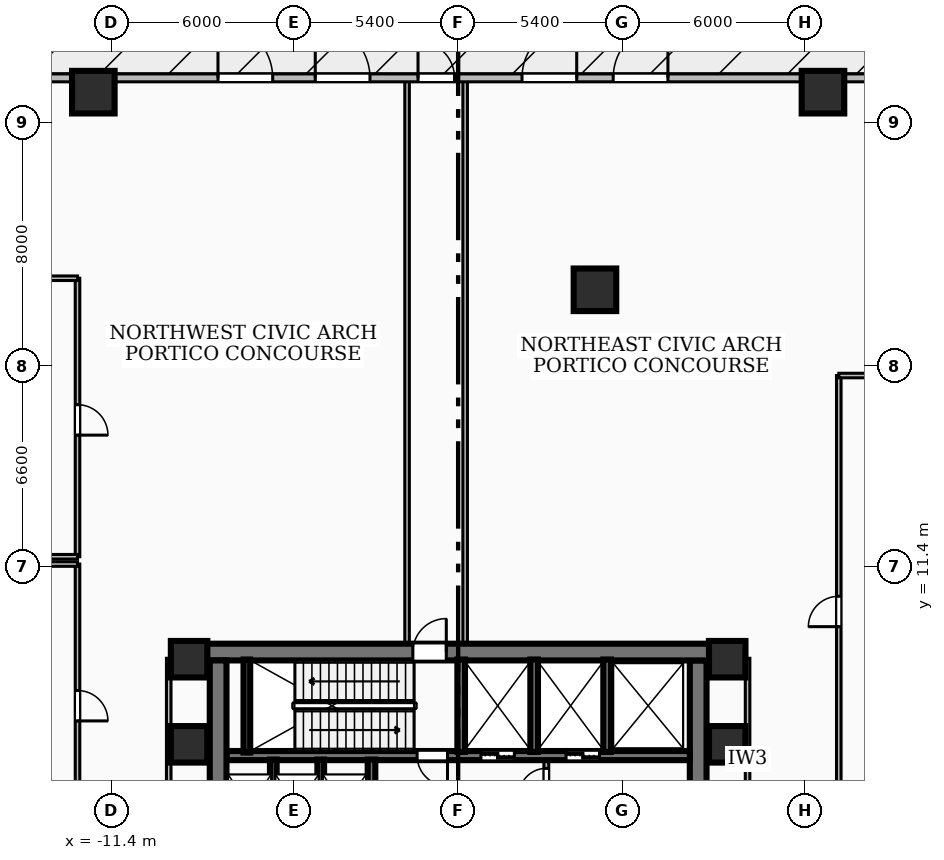
"""IFC4 building model, lengths in metres.
Left out: names, types, materials, properties, quantities, classifications, styles, units other than length and angle.
Written with IfcOpenShell. Run it as: python <this file> out.ifc"""

import sys

from ifc_helpers import new_model, si_unit, direction, frame, frame_2d, origin, origin_2d, place, context, subcontext, project, spatial, rectangle, extrude, element, fill, save


model = new_model("IFC4")
c1 = context("Model", 3, precision=1e-05, world=origin(), true_north=direction((0.0, 1.0)))
c2 = subcontext(c1, "Body", "Model", "MODEL_VIEW")
j1 = project(units=[si_unit("LENGTHUNIT", "METRE"), si_unit("PLANEANGLEUNIT", "RADIAN")], contexts=[c1])
p1 = place(None, origin())
s1 = spatial("IfcSite", under=j1, at=p1, CompositionType="ELEMENT")
p2 = place(p1, origin())
s2 = spatial("IfcBuilding", under=s1, at=p2, CompositionType="ELEMENT")
p3 = place(p2, origin())
s3 = spatial("IfcBuildingStorey", under=s2, at=p3, CompositionType="ELEMENT", Elevation=0.0)
p4 = place(p3, frame((-8.78, 8.585, 0.0), z_axis=(0.0, 0.0, 1.0), x_axis=(1.0, 0.0, 0.0)))
e1 = element("IfcWall", 1, at=p4, inside=s3, PredefinedType="SHEAR", context=c2, shape_type="SweptSolid", body=[
    extrude(rectangle(XDim=17.56, YDim=0.55, at=frame_2d((8.78, 0.0))), origin(), (0.0, 0.0, 1.0), 5.08),
])
p5 = place(p4, frame((7.29, 0.0, 0.0)))
e2 = element("IfcOpeningElement", 2, at=p5, cuts=e1, PredefinedType="OPENING", context=c2, shape_type="SweptSolid", body=[
    extrude(rectangle(XDim=1.1, YDim=2.15, at=frame_2d((0.55, 1.075))), frame((0.0, 0.285, 0.0), z_axis=(0.0, -1.0, 0.0), x_axis=(1.0, 0.0, 0.0)), (0.0, 0.0, 1.0), 0.57),
])
for number, where, z_axis, x_axis in (
    (3, (-7.895, 2.025, 0.0), (0.0, 0.0, 1.0), (0.0, 1.0, 0.0)),
    (4, (7.895, 8.31, 0.0), (0.0, 0.0, 1.0), (0.0, -1.0, 0.0)),
):
    element("IfcWall", number, at=place(p3, frame(where, z_axis=z_axis, x_axis=x_axis)), inside=s3, PredefinedType="SHEAR", context=c2, shape_type="SweptSolid", body=[
        extrude(rectangle(XDim=6.285, YDim=0.55, at=frame_2d((3.143, 0.0))), origin(), (0.0, 0.0, 1.0), 5.08),
    ])
p6 = place(p3, frame((7.62, 5.18, 0.0), z_axis=(0.0, 0.0, 1.0), x_axis=(-1.0, 0.0, 0.0)))
e5 = element("IfcWall", 5, at=p6, inside=s3, PredefinedType="SOLIDWALL", context=c2, shape_type="SweptSolid", body=[
    extrude(rectangle(XDim=15.24, YDim=0.3, at=frame_2d((7.62, 0.0))), origin(), (0.0, 0.0, 1.0), 5.08),
])
p7 = place(p6, frame((5.77, 0.0, 0.0)))
e6 = element("IfcOpeningElement", 6, at=p7, cuts=e5, PredefinedType="OPENING", context=c2, shape_type="SweptSolid", body=[
    extrude(rectangle(XDim=1.1, YDim=2.15, at=frame_2d((0.55, 1.075))), frame((0.0, 0.16, 0.0), z_axis=(0.0, -1.0, 0.0), x_axis=(1.0, 0.0, 0.0)), (0.0, 0.0, 1.0), 0.32),
])
p8 = place(p6, frame((2.97, 0.0, 0.0)))
e7 = element("IfcOpeningElement", 7, at=p8, cuts=e5, PredefinedType="OPENING", context=c2, shape_type="SweptSolid", body=[
    extrude(rectangle(XDim=1.1, YDim=2.15, at=frame_2d((0.55, 1.075))), frame((0.0, 0.16, 0.0), z_axis=(0.0, -1.0, 0.0), x_axis=(1.0, 0.0, 0.0)), (0.0, 0.0, 1.0), 0.32),
])
p9 = place(p6, frame((7.97, 0.0, 0.0)))
e8 = element("IfcOpeningElement", 8, at=p9, cuts=e5, PredefinedType="OPENING", context=c2, shape_type="SweptSolid", body=[
    extrude(rectangle(XDim=1.0, YDim=2.1, at=frame_2d((0.5, 1.05))), frame((0.0, 0.16, 0.0), z_axis=(0.0, -1.0, 0.0), x_axis=(1.0, 0.0, 0.0)), (0.0, 0.0, 1.0), 0.32),
])
p10 = place(p3, frame((-6.95, 5.28, 0.0), z_axis=(0.0, 0.0, 1.0), x_axis=(0.0, 1.0, 0.0)))
e9 = element("IfcWall", 9, at=p10, inside=s3, PredefinedType="SOLIDWALL", context=c2, shape_type="SweptSolid", body=[
    extrude(rectangle(XDim=3.06, YDim=0.22, at=frame_2d((1.53, 0.0))), origin(), (0.0, 0.0, 1.0), 5.08),
])
for number, where, z_axis, x_axis in (
    (10, (0.1, 5.3, 0.0), (0.0, 0.0, 1.0), (0.0, 1.0, 0.0)),
    (11, (2.5, 5.3, 0.0), (0.0, 0.0, 1.0), (0.0, 1.0, 0.0)),
    (12, (4.9, 5.3, 0.0), (0.0, 0.0, 1.0), (0.0, 1.0, 0.0)),
):
    element("IfcWall", number, at=place(p3, frame(where, z_axis=z_axis, x_axis=x_axis)), inside=s3, PredefinedType="SOLIDWALL", context=c2, shape_type="SweptSolid", body=[
        extrude(rectangle(XDim=3.04, YDim=0.25, at=frame_2d((1.52, 0.0))), origin(), (0.0, 0.0, 1.0), 5.08),
    ])
p11 = place(p3, frame((-2.85, 1.98, 0.0), z_axis=(0.0, 0.0, 1.0), x_axis=(0.0, 1.0, 0.0)))
e13 = element("IfcWall", 13, at=p11, inside=s3, PredefinedType="SOLIDWALL", context=c2, shape_type="SweptSolid", body=[
    extrude(rectangle(XDim=3.07, YDim=0.25, at=frame_2d((1.535, 0.0))), origin(), (0.0, 0.0, 1.0), 5.08),
])
for number, where, z_axis, x_axis in (
    (14, (-6.08, 1.98, 0.0), (0.0, 0.0, 1.0), (0.0, 1.0, 0.0)),
    (15, (-4.52, 1.98, 0.0), (0.0, 0.0, 1.0), (0.0, 1.0, 0.0)),
):
    element("IfcWall", number, at=place(p3, frame(where, z_axis=z_axis, x_axis=x_axis)), inside=s3, PredefinedType="SOLIDWALL", context=c2, shape_type="SweptSolid", body=[
        extrude(rectangle(XDim=3.07, YDim=0.22, at=frame_2d((1.535, 0.0))), origin(), (0.0, 0.0, 1.0), 5.08),
    ])
for number, where, z_axis, x_axis in (
    (16, (-8.85, 5.55, 0.0), (0.0, 0.0, 1.0), (1.0, 0.0, 0.0)),
    (17, (8.85, 5.55, 0.0), (0.0, 0.0, 1.0), (1.0, 0.0, 0.0)),
    (18, (-8.85, 8.35, 0.0), (0.0, 0.0, 1.0), (1.0, 0.0, 0.0)),
    (19, (8.85, 8.35, 0.0), (0.0, 0.0, 1.0), (1.0, 0.0, 0.0)),
):
    element("IfcColumn", number, at=place(p3, frame(where, z_axis=z_axis, x_axis=x_axis)), inside=s3, PredefinedType="COLUMN", context=c2, shape_type="SweptSolid", body=[
        extrude(rectangle(XDim=1.2, YDim=1.2, at=origin_2d()), origin(), (0.0, 0.0, 1.0), 5.4),
    ])
for number, where, z_axis, x_axis in (
    (20, (-12.0, 27.0, 0.0), (0.0, 0.0, 1.0), (1.0, 0.0, 0.0)),
    (21, (12.0, 27.0, 0.0), (0.0, 0.0, 1.0), (1.0, 0.0, 0.0)),
    (22, (4.5, 20.5, 0.0), (0.0, 0.0, 1.0), (1.0, 0.0, 0.0)),
):
    element("IfcColumn", number, at=place(p3, frame(where, z_axis=z_axis, x_axis=x_axis)), inside=s3, PredefinedType="COLUMN", context=c2, shape_type="SweptSolid", body=[
        extrude(rectangle(XDim=1.4, YDim=1.4, at=origin_2d()), origin(), (0.0, 0.0, 1.0), 5.4),
    ])
p12 = place(p3, frame((-36.0, 27.47, 0.0), z_axis=(0.0, 0.0, 1.0), x_axis=(1.0, 0.0, 0.0)))
e23 = element("IfcWall", 23, at=p12, inside=s3, PredefinedType="SOLIDWALL", context=c2, shape_type="SweptSolid", body=[
    extrude(rectangle(XDim=72.0, YDim=0.26, at=frame_2d((36.0, 0.0))), origin(), (0.0, 0.0, 1.0), 5.08),
])
p13 = place(p12, frame((34.68, 0.0, 0.0)))
e24 = element("IfcOpeningElement", 24, at=p13, cuts=e23, PredefinedType="OPENING", context=c2, shape_type="SweptSolid", body=[
    extrude(rectangle(XDim=1.2, YDim=2.15, at=frame_2d((0.6, 1.075))), frame((0.0, 0.14, 0.0), z_axis=(0.0, -1.0, 0.0), x_axis=(1.0, 0.0, 0.0)), (0.0, 0.0, 1.0), 0.28),
])
p14 = place(p12, frame((28.1, 0.0, 0.0)))
e25 = element("IfcOpeningElement", 25, at=p14, cuts=e23, PredefinedType="OPENING", context=c2, shape_type="SweptSolid", body=[
    extrude(rectangle(XDim=1.8, YDim=2.3, at=frame_2d((0.9, 1.15))), frame((0.0, 0.14, 0.0), z_axis=(0.0, -1.0, 0.0), x_axis=(1.0, 0.0, 0.0)), (0.0, 0.0, 1.0), 0.28),
])
p15 = place(p12, frame((31.3, 0.0, 0.0)))
e26 = element("IfcOpeningElement", 26, at=p15, cuts=e23, PredefinedType="OPENING", context=c2, shape_type="SweptSolid", body=[
    extrude(rectangle(XDim=1.8, YDim=2.3, at=frame_2d((0.9, 1.15))), frame((0.0, 0.14, 0.0), z_axis=(0.0, -1.0, 0.0), x_axis=(1.0, 0.0, 0.0)), (0.0, 0.0, 1.0), 0.28),
])
p16 = place(p12, frame((38.1, 0.0, 0.0)))
e27 = element("IfcOpeningElement", 27, at=p16, cuts=e23, PredefinedType="OPENING", context=c2, shape_type="SweptSolid", body=[
    extrude(rectangle(XDim=1.8, YDim=2.3, at=frame_2d((0.9, 1.15))), frame((0.0, 0.14, 0.0), z_axis=(0.0, -1.0, 0.0), x_axis=(1.0, 0.0, 0.0)), (0.0, 0.0, 1.0), 0.28),
])
p17 = place(p12, frame((41.1, 0.0, 0.0)))
e28 = element("IfcOpeningElement", 28, at=p17, cuts=e23, PredefinedType="OPENING", context=c2, shape_type="SweptSolid", body=[
    extrude(rectangle(XDim=1.8, YDim=2.3, at=frame_2d((0.9, 1.15))), frame((0.0, 0.14, 0.0), z_axis=(0.0, -1.0, 0.0), x_axis=(1.0, 0.0, 0.0)), (0.0, 0.0, 1.0), 0.28),
])
p18 = place(p12, frame((60.8, 0.0, 0.0)))
e29 = element("IfcOpeningElement", 29, at=p18, cuts=e23, PredefinedType="OPENING", context=c2, shape_type="SweptSolid", body=[
    extrude(rectangle(XDim=6.0, YDim=3.1, at=frame_2d((3.0, 1.55))), frame((0.0, 0.14, 0.0), z_axis=(0.0, -1.0, 0.0), x_axis=(1.0, 0.0, 0.0)), (0.0, 0.0, 1.0), 0.28),
])
p19 = place(p3, frame((2.9, 2.04, 0.0), z_axis=(0.0, 0.0, 1.0), x_axis=(0.0, 1.0, 0.0)))
e30 = element("IfcWall", 30, at=p19, inside=s3, PredefinedType="PARTITIONING", context=c2, shape_type="SweptSolid", body=[
    extrude(rectangle(XDim=2.94, YDim=0.16, at=frame_2d((1.47, 0.0))), origin(), (0.0, 0.0, 1.0), 4.145),
])
p20 = place(p19, frame((1.82, 0.0, 0.0)))
e31 = element("IfcOpeningElement", 31, at=p20, cuts=e30, PredefinedType="OPENING", context=c2, shape_type="SweptSolid", body=[
    extrude(rectangle(XDim=0.9, YDim=2.06, at=frame_2d((0.45, 1.03))), frame((0.0, 0.09, 0.0), z_axis=(0.0, -1.0, 0.0), x_axis=(1.0, 0.0, 0.0)), (0.0, 0.0, 1.0), 0.18),
])
for number, where, z_axis, x_axis in (
    (32, (-9.52, 1.75, 0.0), (0.0, 0.0, 1.0), (0.0, 1.0, 0.0)),
    (33, (9.52, 1.75, 0.0), (0.0, 0.0, 1.0), (0.0, 1.0, 0.0)),
):
    element("IfcWall", number, at=place(p3, frame(where, z_axis=z_axis, x_axis=x_axis)), inside=s3, PredefinedType="PARTITIONING", context=c2, shape_type="SweptSolid", body=[
        extrude(rectangle(XDim=6.63, YDim=0.15, at=frame_2d((3.315, 0.0))), origin(), (0.0, 0.0, 1.0), 4.09),
    ])
for number, where, z_axis, x_axis in (
    (34, (-1.68, 8.7, 0.0), (0.0, 0.0, 1.0), (0.0, 1.0, 0.0)),
    (35, (0.23, 8.7, 0.0), (0.0, 0.0, 1.0), (0.0, 1.0, 0.0)),
):
    element("IfcWall", number, at=place(p3, frame(where, z_axis=z_axis, x_axis=x_axis)), inside=s3, PredefinedType="PARTITIONING", context=c2, shape_type="SweptSolid", body=[
        extrude(rectangle(XDim=18.7, YDim=0.15, at=frame_2d((9.35, 0.0))), origin(), (0.0, 0.0, 1.0), 4.09),
    ])
p21 = place(p3, frame((-12.52, 11.48, 0.0), z_axis=(0.0, 0.0, 1.0), x_axis=(0.0, -1.0, 0.0)))
e36 = element("IfcWall", 36, at=p21, inside=s3, PredefinedType="PARTITIONING", context=c2, shape_type="SweptSolid", body=[
    extrude(rectangle(XDim=9.16, YDim=0.15, at=frame_2d((4.58, 0.0))), origin(), (0.0, 0.0, 1.0), 4.09),
])
p22 = place(p21, frame((4.16, 0.0, 0.0)))
e37 = element("IfcOpeningElement", 37, at=p22, cuts=e36, PredefinedType="OPENING", context=c2, shape_type="SweptSolid", body=[
    extrude(rectangle(XDim=1.0, YDim=2.1, at=frame_2d((0.5, 1.05))), frame((0.0, 0.085, 0.0), z_axis=(0.0, -1.0, 0.0), x_axis=(1.0, 0.0, 0.0)), (0.0, 0.0, 1.0), 0.17),
])
p23 = place(p3, frame((-22.8, 11.48, 0.0), z_axis=(0.0, 0.0, 1.0), x_axis=(1.0, 0.0, 0.0)))
e38 = element("IfcWall", 38, at=p23, inside=s3, PredefinedType="PARTITIONING", context=c2, shape_type="SweptSolid", body=[
    extrude(rectangle(XDim=10.28, YDim=0.15, at=frame_2d((5.14, 0.0))), origin(), (0.0, 0.0, 1.0), 5.08),
])
p24 = place(p3, frame((-12.52, 20.88, 0.0), z_axis=(0.0, 0.0, 1.0), x_axis=(0.0, -1.0, 0.0)))
e39 = element("IfcWall", 39, at=p24, inside=s3, PredefinedType="PARTITIONING", context=c2, shape_type="SweptSolid", body=[
    extrude(rectangle(XDim=9.16, YDim=0.15, at=frame_2d((4.58, 0.0))), origin(), (0.0, 0.0, 1.0), 4.09),
])
p25 = place(p24, frame((4.16, 0.0, 0.0)))
e40 = element("IfcOpeningElement", 40, at=p25, cuts=e39, PredefinedType="OPENING", context=c2, shape_type="SweptSolid", body=[
    extrude(rectangle(XDim=1.0, YDim=2.1, at=frame_2d((0.5, 1.05))), frame((0.0, 0.085, 0.0), z_axis=(0.0, -1.0, 0.0), x_axis=(1.0, 0.0, 0.0)), (0.0, 0.0, 1.0), 0.17),
])
for number, where, z_axis, x_axis in (
    (41, (-22.8, 11.72, 0.0), (0.0, 0.0, 1.0), (1.0, 0.0, 0.0)),
    (42, (-22.8, 20.88, 0.0), (0.0, 0.0, 1.0), (1.0, 0.0, 0.0)),
):
    element("IfcWall", number, at=place(p3, frame(where, z_axis=z_axis, x_axis=x_axis)), inside=s3, PredefinedType="PARTITIONING", context=c2, shape_type="SweptSolid", body=[
        extrude(rectangle(XDim=10.28, YDim=0.15, at=frame_2d((5.14, 0.0))), origin(), (0.0, 0.0, 1.0), 5.08),
    ])
p26 = place(p3, frame((12.52, 2.32, 0.0), z_axis=(0.0, 0.0, 1.0), x_axis=(0.0, 1.0, 0.0)))
e43 = element("IfcWall", 43, at=p26, inside=s3, PredefinedType="PARTITIONING", context=c2, shape_type="SweptSolid", body=[
    extrude(rectangle(XDim=15.36, YDim=0.15, at=frame_2d((7.68, 0.0))), origin(), (0.0, 0.0, 1.0), 4.09),
])
p27 = place(p26, frame((7.1, 0.0, 0.0)))
e44 = element("IfcOpeningElement", 44, at=p27, cuts=e43, PredefinedType="OPENING", context=c2, shape_type="SweptSolid", body=[
    extrude(rectangle(XDim=1.0, YDim=2.1, at=frame_2d((0.5, 1.05))), frame((0.0, 0.085, 0.0), z_axis=(0.0, -1.0, 0.0), x_axis=(1.0, 0.0, 0.0)), (0.0, 0.0, 1.0), 0.17),
])
p28 = place(p3, frame((12.52, 17.68, 0.0), z_axis=(0.0, 0.0, 1.0), x_axis=(1.0, 0.0, 0.0)))
e45 = element("IfcWall", 45, at=p28, inside=s3, PredefinedType="PARTITIONING", context=c2, shape_type="SweptSolid", body=[
    extrude(rectangle(XDim=10.08, YDim=0.15, at=frame_2d((5.04, 0.0))), origin(), (0.0, 0.0, 1.0), 5.08),
])
p29 = place(p13, origin())
e46 = element("IfcDoor", 46, at=p29, inside=s3, OperationType="SINGLE_SWING_LEFT", PredefinedType="DOOR", context=c2, shape_type="SweptSolid", body=[
    extrude(rectangle(XDim=1.2, YDim=2.15, at=frame_2d((0.6, 1.075))), frame((0.0, 0.025, 0.0), z_axis=(0.0, -1.0, 0.0), x_axis=(1.0, 0.0, 0.0)), (0.0, 0.0, 1.0), 0.05),
])
fill(e24, e46)
p30 = place(p14, origin())
e47 = element("IfcDoor", 47, at=p30, inside=s3, OperationType="SINGLE_SWING_LEFT", PredefinedType="DOOR", context=c2, shape_type="SweptSolid", body=[
    extrude(rectangle(XDim=1.8, YDim=2.3, at=frame_2d((0.9, 1.15))), frame((0.0, 0.025, 0.0), z_axis=(0.0, -1.0, 0.0), x_axis=(1.0, 0.0, 0.0)), (0.0, 0.0, 1.0), 0.05),
])
fill(e25, e47)
p31 = place(p15, origin())
e48 = element("IfcDoor", 48, at=p31, inside=s3, OperationType="SINGLE_SWING_LEFT", PredefinedType="DOOR", context=c2, shape_type="SweptSolid", body=[
    extrude(rectangle(XDim=1.8, YDim=2.3, at=frame_2d((0.9, 1.15))), frame((0.0, 0.025, 0.0), z_axis=(0.0, -1.0, 0.0), x_axis=(1.0, 0.0, 0.0)), (0.0, 0.0, 1.0), 0.05),
])
fill(e26, e48)
p32 = place(p16, origin())
e49 = element("IfcDoor", 49, at=p32, inside=s3, OperationType="SINGLE_SWING_RIGHT", PredefinedType="DOOR", context=c2, shape_type="SweptSolid", body=[
    extrude(rectangle(XDim=1.8, YDim=2.3, at=frame_2d((0.9, 1.15))), frame((0.0, 0.025, 0.0), z_axis=(0.0, -1.0, 0.0), x_axis=(1.0, 0.0, 0.0)), (0.0, 0.0, 1.0), 0.05),
])
fill(e27, e49)
p33 = place(p17, origin())
e50 = element("IfcDoor", 50, at=p33, inside=s3, OperationType="SINGLE_SWING_RIGHT", PredefinedType="DOOR", context=c2, shape_type="SweptSolid", body=[
    extrude(rectangle(XDim=1.8, YDim=2.3, at=frame_2d((0.9, 1.15))), frame((0.0, 0.025, 0.0), z_axis=(0.0, -1.0, 0.0), x_axis=(1.0, 0.0, 0.0)), (0.0, 0.0, 1.0), 0.05),
])
fill(e28, e50)
p34 = place(p7, origin())
e51 = element("IfcDoor", 51, at=p34, inside=s3, OperationType="DOUBLE_DOOR_SLIDING", PredefinedType="DOOR", context=c2, shape_type="SweptSolid", body=[
    extrude(rectangle(XDim=1.1, YDim=2.15, at=frame_2d((0.55, 1.075))), frame((0.0, 0.025, 0.0), z_axis=(0.0, -1.0, 0.0), x_axis=(1.0, 0.0, 0.0)), (0.0, 0.0, 1.0), 0.05),
])
fill(e6, e51)
p35 = place(p8, origin())
e52 = element("IfcDoor", 52, at=p35, inside=s3, OperationType="DOUBLE_DOOR_SLIDING", PredefinedType="DOOR", context=c2, shape_type="SweptSolid", body=[
    extrude(rectangle(XDim=1.1, YDim=2.15, at=frame_2d((0.55, 1.075))), frame((0.0, 0.025, 0.0), z_axis=(0.0, -1.0, 0.0), x_axis=(1.0, 0.0, 0.0)), (0.0, 0.0, 1.0), 0.05),
])
fill(e7, e52)
p36 = place(p9, origin())
e53 = element("IfcDoor", 53, at=p36, inside=s3, OperationType="SINGLE_SWING_LEFT", PredefinedType="DOOR", context=c2, shape_type="SweptSolid", body=[
    extrude(rectangle(XDim=1.0, YDim=2.1, at=frame_2d((0.5, 1.05))), frame((0.0, 0.025, 0.0), z_axis=(0.0, -1.0, 0.0), x_axis=(1.0, 0.0, 0.0)), (0.0, 0.0, 1.0), 0.05),
])
fill(e8, e53)
p37 = place(p5, origin())
e54 = element("IfcDoor", 54, at=p37, inside=s3, OperationType="SINGLE_SWING_RIGHT", PredefinedType="DOOR", context=c2, shape_type="SweptSolid", body=[
    extrude(rectangle(XDim=1.1, YDim=2.15, at=frame_2d((0.55, 1.075))), frame((0.0, 0.025, 0.0), z_axis=(0.0, -1.0, 0.0), x_axis=(1.0, 0.0, 0.0)), (0.0, 0.0, 1.0), 0.05),
])
fill(e2, e54)
p38 = place(p20, origin())
e55 = element("IfcDoor", 55, at=p38, inside=s3, OperationType="SINGLE_SWING_LEFT", PredefinedType="DOOR", context=c2, shape_type="SweptSolid", body=[
    extrude(rectangle(XDim=0.9, YDim=2.06, at=frame_2d((0.45, 1.03))), frame((0.0, 0.025, 0.0), z_axis=(0.0, -1.0, 0.0), x_axis=(1.0, 0.0, 0.0)), (0.0, 0.0, 1.0), 0.05),
])
fill(e31, e55)
p39 = place(p22, origin())
e56 = element("IfcDoor", 56, at=p39, inside=s3, OperationType="SINGLE_SWING_RIGHT", PredefinedType="DOOR", context=c2, shape_type="SweptSolid", body=[
    extrude(rectangle(XDim=1.0, YDim=2.1, at=frame_2d((0.5, 1.05))), frame((0.0, 0.025, 0.0), z_axis=(0.0, -1.0, 0.0), x_axis=(1.0, 0.0, 0.0)), (0.0, 0.0, 1.0), 0.05),
])
fill(e37, e56)
p40 = place(p25, origin())
e57 = element("IfcDoor", 57, at=p40, inside=s3, OperationType="SINGLE_SWING_RIGHT", PredefinedType="DOOR", context=c2, shape_type="SweptSolid", body=[
    extrude(rectangle(XDim=1.0, YDim=2.1, at=frame_2d((0.5, 1.05))), frame((0.0, 0.025, 0.0), z_axis=(0.0, -1.0, 0.0), x_axis=(1.0, 0.0, 0.0)), (0.0, 0.0, 1.0), 0.05),
])
fill(e40, e57)
p41 = place(p27, origin())
e58 = element("IfcDoor", 58, at=p41, inside=s3, OperationType="SINGLE_SWING_LEFT", PredefinedType="DOOR", context=c2, shape_type="SweptSolid", body=[
    extrude(rectangle(XDim=1.0, YDim=2.1, at=frame_2d((0.5, 1.05))), frame((0.0, 0.025, 0.0), z_axis=(0.0, -1.0, 0.0), x_axis=(1.0, 0.0, 0.0)), (0.0, 0.0, 1.0), 0.05),
])
fill(e44, e58)
save(model, sys.argv[1])
